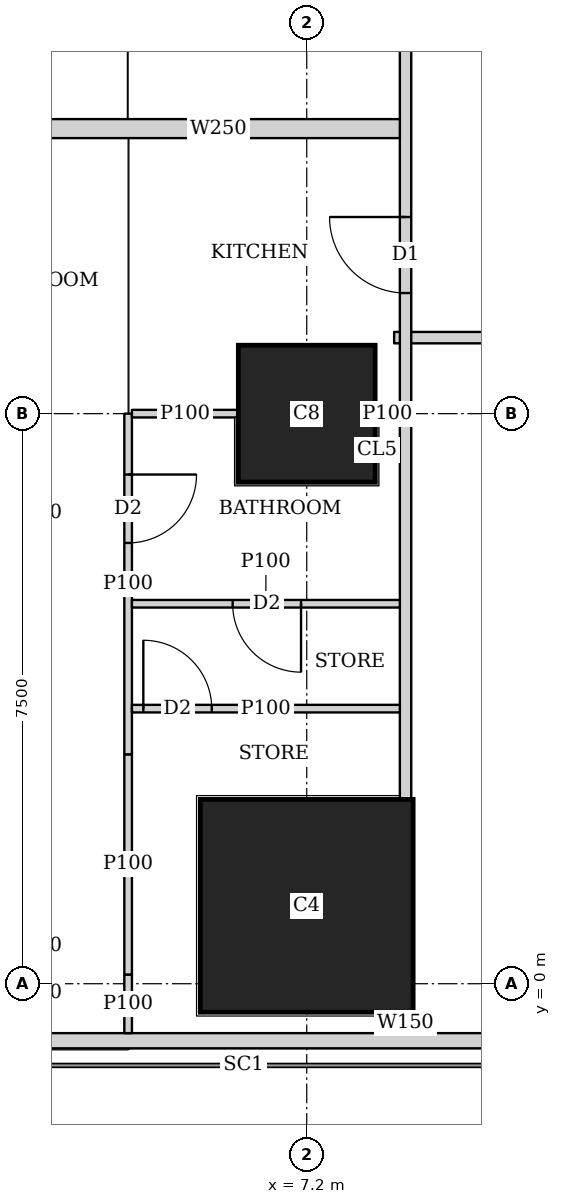
"""IFC4 building model, lengths in metres.
Left out: names, types, materials, properties, quantities, classifications, styles, units other than length and angle.
Written with IfcOpenShell. Run it as: python <this file> out.ifc"""

import sys

from ifc_helpers import new_model, si_unit, direction, frame, frame_2d, origin, origin_2d, place, context, subcontext, project, spatial, rectangle, extrude, element, fill, save


model = new_model("IFC4")
c1 = context("Model", 3, precision=1e-05, world=origin(), true_north=direction((0.0, 1.0)))
c2 = subcontext(c1, "Body", "Model", "MODEL_VIEW")
j1 = project(units=[si_unit("LENGTHUNIT", "METRE"), si_unit("PLANEANGLEUNIT", "RADIAN")], contexts=[c1])
p1 = place(None, origin())
s1 = spatial("IfcSite", under=j1, at=p1, CompositionType="ELEMENT")
p2 = place(p1, origin())
s2 = spatial("IfcBuilding", under=s1, at=p2, CompositionType="ELEMENT")
p3 = place(p2, frame((0.0, 0.0, 68.75)))
s3 = spatial("IfcBuildingStorey", under=s2, at=p3, CompositionType="ELEMENT", Elevation=68.75)
p4 = place(p3, frame((7.2, 1.025, 0.0), z_axis=(0.0, 0.0, 1.0), x_axis=(1.0, 0.0, 0.0)))
e1 = element("IfcColumn", 1, at=p4, inside=s3, PredefinedType="COLUMN", context=c2, shape_type="SweptSolid", body=[
    extrude(rectangle(XDim=2.8, YDim=2.8, at=origin_2d()), origin(), (0.0, 0.0, 1.0), 3.75),
])
p5 = place(p3, frame((7.2, 7.5, 0.0), z_axis=(0.0, 0.0, 1.0), x_axis=(1.0, 0.0, 0.0)))
e2 = element("IfcColumn", 2, at=p5, inside=s3, PredefinedType="COLUMN", context=c2, shape_type="SweptSolid", body=[
    extrude(rectangle(XDim=1.8, YDim=1.8, at=origin_2d()), origin(), (0.0, 0.0, 1.0), 3.75),
])
p6 = place(p3, frame((2.163, -0.75, 0.0), z_axis=(0.0, 0.0, 1.0), x_axis=(1.0, 0.0, 0.0)))
e3 = element("IfcWall", 3, at=p6, inside=s3, PredefinedType="SOLIDWALL", context=c2, shape_type="SweptSolid", body=[
    extrude(rectangle(XDim=45.628, YDim=0.2, at=frame_2d((22.814, 0.0))), origin(), (0.0, 0.0, 1.0), 3.45),
])
p7 = place(p6, frame((9.537, 0.0, 0.9)))
e4 = element("IfcOpeningElement", 4, at=p7, cuts=e3, PredefinedType="OPENING", context=c2, shape_type="SweptSolid", body=[
    extrude(rectangle(XDim=1.8, YDim=1.5, at=frame_2d((0.9, 0.75))), frame((0.0, 0.11, 0.0), z_axis=(0.0, -1.0, 0.0), x_axis=(1.0, 0.0, 0.0)), (0.0, 0.0, 1.0), 0.22),
])
p8 = place(p6, frame((13.137, 0.0, 0.9)))
e5 = element("IfcOpeningElement", 5, at=p8, cuts=e3, PredefinedType="OPENING", context=c2, shape_type="SweptSolid", body=[
    extrude(rectangle(XDim=1.8, YDim=1.5, at=frame_2d((0.9, 0.75))), frame((0.0, 0.11, 0.0), z_axis=(0.0, -1.0, 0.0), x_axis=(1.0, 0.0, 0.0)), (0.0, 0.0, 1.0), 0.22),
])
p9 = place(p6, frame((16.737, 0.0, 0.9)))
e6 = element("IfcOpeningElement", 6, at=p9, cuts=e3, PredefinedType="OPENING", context=c2, shape_type="SweptSolid", body=[
    extrude(rectangle(XDim=1.8, YDim=1.5, at=frame_2d((0.9, 0.75))), frame((0.0, 0.11, 0.0), z_axis=(0.0, -1.0, 0.0), x_axis=(1.0, 0.0, 0.0)), (0.0, 0.0, 1.0), 0.22),
])
p10 = place(p6, frame((20.337, 0.0, 0.9)))
e7 = element("IfcOpeningElement", 7, at=p10, cuts=e3, PredefinedType="OPENING", context=c2, shape_type="SweptSolid", body=[
    extrude(rectangle(XDim=1.8, YDim=1.5, at=frame_2d((0.9, 0.75))), frame((0.0, 0.11, 0.0), z_axis=(0.0, -1.0, 0.0), x_axis=(1.0, 0.0, 0.0)), (0.0, 0.0, 1.0), 0.22),
])
p11 = place(p6, frame((23.937, 0.0, 0.9)))
e8 = element("IfcOpeningElement", 8, at=p11, cuts=e3, PredefinedType="OPENING", context=c2, shape_type="SweptSolid", body=[
    extrude(rectangle(XDim=1.8, YDim=1.5, at=frame_2d((0.9, 0.75))), frame((0.0, 0.11, 0.0), z_axis=(0.0, -1.0, 0.0), x_axis=(1.0, 0.0, 0.0)), (0.0, 0.0, 1.0), 0.22),
])
p12 = place(p6, frame((27.537, 0.0, 0.9)))
e9 = element("IfcOpeningElement", 9, at=p12, cuts=e3, PredefinedType="OPENING", context=c2, shape_type="SweptSolid", body=[
    extrude(rectangle(XDim=1.8, YDim=1.5, at=frame_2d((0.9, 0.75))), frame((0.0, 0.11, 0.0), z_axis=(0.0, -1.0, 0.0), x_axis=(1.0, 0.0, 0.0)), (0.0, 0.0, 1.0), 0.22),
])
p13 = place(p6, frame((31.137, 0.0, 0.9)))
e10 = element("IfcOpeningElement", 10, at=p13, cuts=e3, PredefinedType="OPENING", context=c2, shape_type="SweptSolid", body=[
    extrude(rectangle(XDim=1.8, YDim=1.5, at=frame_2d((0.9, 0.75))), frame((0.0, 0.11, 0.0), z_axis=(0.0, -1.0, 0.0), x_axis=(1.0, 0.0, 0.0)), (0.0, 0.0, 1.0), 0.22),
])
p14 = place(p6, frame((34.737, 0.0, 0.9)))
e11 = element("IfcOpeningElement", 11, at=p14, cuts=e3, PredefinedType="OPENING", context=c2, shape_type="SweptSolid", body=[
    extrude(rectangle(XDim=1.8, YDim=1.5, at=frame_2d((0.9, 0.75))), frame((0.0, 0.11, 0.0), z_axis=(0.0, -1.0, 0.0), x_axis=(1.0, 0.0, 0.0)), (0.0, 0.0, 1.0), 0.22),
])
p15 = place(p3, frame((8.5, -0.65, 0.0), z_axis=(0.0, 0.0, 1.0), x_axis=(0.0, 1.0, 0.0)))
e12 = element("IfcWall", 12, at=p15, inside=s3, PredefinedType="SOLIDWALL", context=c2, shape_type="SweptSolid", body=[
    extrude(rectangle(XDim=0.274, YDim=0.15, at=frame_2d((0.137, 0.0))), origin(), (0.0, 0.0, 1.0), 3.45),
])
p16 = place(p3, frame((8.5, 2.426, 0.0), z_axis=(0.0, 0.0, 1.0), x_axis=(0.0, 1.0, 0.0)))
e13 = element("IfcWall", 13, at=p16, inside=s3, PredefinedType="SOLIDWALL", context=c2, shape_type="SweptSolid", body=[
    extrude(rectangle(XDim=40.173, YDim=0.15, at=frame_2d((20.086, 0.0))), origin(), (0.0, 0.0, 1.0), 3.45),
])
p17 = place(p16, frame((6.661, 0.0, 0.0)))
e14 = element("IfcOpeningElement", 14, at=p17, cuts=e13, PredefinedType="OPENING", context=c2, shape_type="SweptSolid", body=[
    extrude(rectangle(XDim=1.0, YDim=2.1, at=frame_2d((0.5, 1.05))), frame((0.0, 0.085, 0.0), z_axis=(0.0, -1.0, 0.0), x_axis=(1.0, 0.0, 0.0)), (0.0, 0.0, 1.0), 0.17),
])
p18 = place(p16, frame((9.986, 0.0, 0.0)))
e15 = element("IfcOpeningElement", 15, at=p18, cuts=e13, PredefinedType="OPENING", context=c2, shape_type="SweptSolid", body=[
    extrude(rectangle(XDim=1.0, YDim=2.1, at=frame_2d((0.5, 1.05))), frame((0.0, 0.085, 0.0), z_axis=(0.0, -1.0, 0.0), x_axis=(1.0, 0.0, 0.0)), (0.0, 0.0, 1.0), 0.17),
])
p19 = place(p16, frame((17.487, 0.0, 0.0)))
e16 = element("IfcOpeningElement", 16, at=p19, cuts=e13, PredefinedType="OPENING", context=c2, shape_type="SweptSolid", body=[
    extrude(rectangle(XDim=1.0, YDim=2.1, at=frame_2d((0.5, 1.05))), frame((0.0, 0.085, 0.0), z_axis=(0.0, -1.0, 0.0), x_axis=(1.0, 0.0, 0.0)), (0.0, 0.0, 1.0), 0.17),
])
p20 = place(p16, frame((24.987, 0.0, 0.0)))
e17 = element("IfcOpeningElement", 17, at=p20, cuts=e13, PredefinedType="OPENING", context=c2, shape_type="SweptSolid", body=[
    extrude(rectangle(XDim=1.0, YDim=2.1, at=frame_2d((0.5, 1.05))), frame((0.0, 0.085, 0.0), z_axis=(0.0, -1.0, 0.0), x_axis=(1.0, 0.0, 0.0)), (0.0, 0.0, 1.0), 0.17),
])
p21 = place(p3, frame((40.054, 8.5, 0.0), z_axis=(0.0, 0.0, 1.0), x_axis=(-1.0, 0.0, 0.0)))
e18 = element("IfcWall", 18, at=p21, inside=s3, PredefinedType="SOLIDWALL", context=c2, shape_type="SweptSolid", body=[
    extrude(rectangle(XDim=31.704, YDim=0.15, at=frame_2d((15.852, 0.0))), origin(), (0.0, 0.0, 1.0), 3.45),
])
p22 = place(p21, frame((28.104, 0.0, 0.0)))
e19 = element("IfcOpeningElement", 19, at=p22, cuts=e18, PredefinedType="OPENING", context=c2, shape_type="SweptSolid", body=[
    extrude(rectangle(XDim=1.0, YDim=2.1, at=frame_2d((0.5, 1.05))), frame((0.0, 0.085, 0.0), z_axis=(0.0, -1.0, 0.0), x_axis=(1.0, 0.0, 0.0)), (0.0, 0.0, 1.0), 0.17),
])
p23 = place(p21, frame((19.755, 0.0, 0.0)))
e20 = element("IfcOpeningElement", 20, at=p23, cuts=e18, PredefinedType="OPENING", context=c2, shape_type="SweptSolid", body=[
    extrude(rectangle(XDim=1.0, YDim=2.1, at=frame_2d((0.5, 1.05))), frame((0.0, 0.085, 0.0), z_axis=(0.0, -1.0, 0.0), x_axis=(1.0, 0.0, 0.0)), (0.0, 0.0, 1.0), 0.17),
])
p24 = place(p21, frame((12.555, 0.0, 0.0)))
e21 = element("IfcOpeningElement", 21, at=p24, cuts=e18, PredefinedType="OPENING", context=c2, shape_type="SweptSolid", body=[
    extrude(rectangle(XDim=1.0, YDim=2.1, at=frame_2d((0.5, 1.05))), frame((0.0, 0.085, 0.0), z_axis=(0.0, -1.0, 0.0), x_axis=(1.0, 0.0, 0.0)), (0.0, 0.0, 1.0), 0.17),
])
p25 = place(p21, frame((5.355, 0.0, 0.0)))
e22 = element("IfcOpeningElement", 22, at=p25, cuts=e18, PredefinedType="OPENING", context=c2, shape_type="SweptSolid", body=[
    extrude(rectangle(XDim=1.0, YDim=2.1, at=frame_2d((0.5, 1.05))), frame((0.0, 0.085, 0.0), z_axis=(0.0, -1.0, 0.0), x_axis=(1.0, 0.0, 0.0)), (0.0, 0.0, 1.0), 0.17),
])
p26 = place(p3, frame((4.85, -0.65, 0.0), z_axis=(0.0, 0.0, 1.0), x_axis=(0.0, 1.0, 0.0)))
e23 = element("IfcWall", 23, at=p26, inside=s3, PredefinedType="PARTITIONING", context=c2, shape_type="SweptSolid", body=[
    extrude(rectangle(XDim=0.771, YDim=0.1, at=frame_2d((0.385, 0.0))), origin(), (0.0, 0.0, 1.0), 3.45),
])
p27 = place(p3, frame((4.85, 0.121, 0.0), z_axis=(0.0, 0.0, 1.0), x_axis=(0.0, 1.0, 0.0)))
e24 = element("IfcWall", 24, at=p27, inside=s3, PredefinedType="PARTITIONING", context=c2, shape_type="SweptSolid", body=[
    extrude(rectangle(XDim=2.897, YDim=0.1, at=frame_2d((1.448, 0.0))), origin(), (0.0, 0.0, 1.0), 2.0),
])
p28 = place(p3, frame((4.85, 3.018, 0.0), z_axis=(0.0, 0.0, 1.0), x_axis=(0.0, 1.0, 0.0)))
e25 = element("IfcWall", 25, at=p28, inside=s3, PredefinedType="PARTITIONING", context=c2, shape_type="SweptSolid", body=[
    extrude(rectangle(XDim=4.482, YDim=0.1, at=frame_2d((2.241, 0.0))), origin(), (0.0, 0.0, 1.0), 3.45),
])
p29 = place(p28, frame((2.781, 0.0, 0.0)))
e26 = element("IfcOpeningElement", 26, at=p29, cuts=e25, PredefinedType="OPENING", context=c2, shape_type="SweptSolid", body=[
    extrude(rectangle(XDim=0.9, YDim=2.1, at=frame_2d((0.45, 1.05))), frame((0.0, 0.06, 0.0), z_axis=(0.0, -1.0, 0.0), x_axis=(1.0, 0.0, 0.0)), (0.0, 0.0, 1.0), 0.12),
])
p30 = place(p3, frame((4.9, 4.999, 0.0), z_axis=(0.0, 0.0, 1.0), x_axis=(1.0, 0.0, 0.0)))
e27 = element("IfcWall", 27, at=p30, inside=s3, PredefinedType="PARTITIONING", context=c2, shape_type="SweptSolid", body=[
    extrude(rectangle(XDim=3.525, YDim=0.1, at=frame_2d((1.763, 0.0))), origin(), (0.0, 0.0, 1.0), 3.45),
])
p31 = place(p30, frame((1.325, 0.0, 0.0)))
e28 = element("IfcOpeningElement", 28, at=p31, cuts=e27, PredefinedType="OPENING", context=c2, shape_type="SweptSolid", body=[
    extrude(rectangle(XDim=0.9, YDim=2.1, at=frame_2d((0.45, 1.05))), frame((0.0, 0.06, 0.0), z_axis=(0.0, -1.0, 0.0), x_axis=(1.0, 0.0, 0.0)), (0.0, 0.0, 1.0), 0.12),
])
p32 = place(p3, frame((4.9, 7.5, 0.0), z_axis=(0.0, 0.0, 1.0), x_axis=(1.0, 0.0, 0.0)))
e29 = element("IfcWall", 29, at=p32, inside=s3, PredefinedType="PARTITIONING", context=c2, shape_type="SweptSolid", body=[
    extrude(rectangle(XDim=1.399, YDim=0.1, at=frame_2d((0.7, 0.0))), origin(), (0.0, 0.0, 1.0), 3.45),
])
p33 = place(p3, frame((8.101, 7.5, 0.0), z_axis=(0.0, 0.0, 1.0), x_axis=(1.0, 0.0, 0.0)))
e30 = element("IfcWall", 30, at=p33, inside=s3, PredefinedType="PARTITIONING", context=c2, shape_type="SweptSolid", body=[
    extrude(rectangle(XDim=0.324, YDim=0.1, at=frame_2d((0.162, 0.0))), origin(), (0.0, 0.0, 1.0), 3.45),
])
p34 = place(p3, frame((3.65, 11.25, 0.0), z_axis=(0.0, 0.0, 1.0), x_axis=(1.0, 0.0, 0.0)))
e31 = element("IfcWall", 31, at=p34, inside=s3, PredefinedType="SOLIDWALL", context=c2, shape_type="SweptSolid", body=[
    extrude(rectangle(XDim=4.775, YDim=0.25, at=frame_2d((2.388, 0.0))), origin(), (0.0, 0.0, 1.0), 3.45),
])
p35 = place(p3, frame((4.9, 3.619, 0.0), z_axis=(0.0, 0.0, 1.0), x_axis=(1.0, 0.0, 0.0)))
e32 = element("IfcWall", 32, at=p35, inside=s3, PredefinedType="PARTITIONING", context=c2, shape_type="SweptSolid", body=[
    extrude(rectangle(XDim=3.525, YDim=0.1, at=frame_2d((1.763, 0.0))), origin(), (0.0, 0.0, 1.0), 3.45),
])
p36 = place(p35, frame((0.15, 0.0, 0.0)))
e33 = element("IfcOpeningElement", 33, at=p36, cuts=e32, PredefinedType="OPENING", context=c2, shape_type="SweptSolid", body=[
    extrude(rectangle(XDim=0.9, YDim=2.1, at=frame_2d((0.45, 1.05))), frame((0.0, 0.06, 0.0), z_axis=(0.0, -1.0, 0.0), x_axis=(1.0, 0.0, 0.0)), (0.0, 0.0, 1.0), 0.12),
])
p37 = place(p29, origin())
e34 = element("IfcDoor", 34, at=p37, inside=s3, OperationType="SINGLE_SWING_LEFT", PredefinedType="DOOR", context=c2, shape_type="SweptSolid", body=[
    extrude(rectangle(XDim=0.9, YDim=2.1, at=frame_2d((0.45, 1.05))), frame((0.0, 0.025, 0.0), z_axis=(0.0, -1.0, 0.0), x_axis=(1.0, 0.0, 0.0)), (0.0, 0.0, 1.0), 0.05),
])
fill(e26, e34)
p38 = place(p17, origin())
e35 = element("IfcDoor", 35, at=p38, inside=s3, OperationType="SINGLE_SWING_RIGHT", PredefinedType="DOOR", context=c2, shape_type="SweptSolid", body=[
    extrude(rectangle(XDim=1.0, YDim=2.1, at=frame_2d((0.5, 1.05))), frame((0.0, 0.025, 0.0), z_axis=(0.0, -1.0, 0.0), x_axis=(1.0, 0.0, 0.0)), (0.0, 0.0, 1.0), 0.05),
])
fill(e14, e35)
p39 = place(p31, origin())
e36 = element("IfcDoor", 36, at=p39, inside=s3, OperationType="SINGLE_SWING_LEFT", PredefinedType="DOOR", context=c2, shape_type="SweptSolid", body=[
    extrude(rectangle(XDim=0.9, YDim=2.1, at=frame_2d((0.45, 1.05))), frame((0.0, 0.025, 0.0), z_axis=(0.0, -1.0, 0.0), x_axis=(1.0, 0.0, 0.0)), (0.0, 0.0, 1.0), 0.05),
])
fill(e28, e36)
p40 = place(p36, origin())
e37 = element("IfcDoor", 37, at=p40, inside=s3, OperationType="SINGLE_SWING_LEFT", PredefinedType="DOOR", context=c2, shape_type="SweptSolid", body=[
    extrude(rectangle(XDim=0.9, YDim=2.1, at=frame_2d((0.45, 1.05))), frame((0.0, 0.025, 0.0), z_axis=(0.0, -1.0, 0.0), x_axis=(1.0, 0.0, 0.0)), (0.0, 0.0, 1.0), 0.05),
])
fill(e33, e37)
save(model, sys.argv[1])
